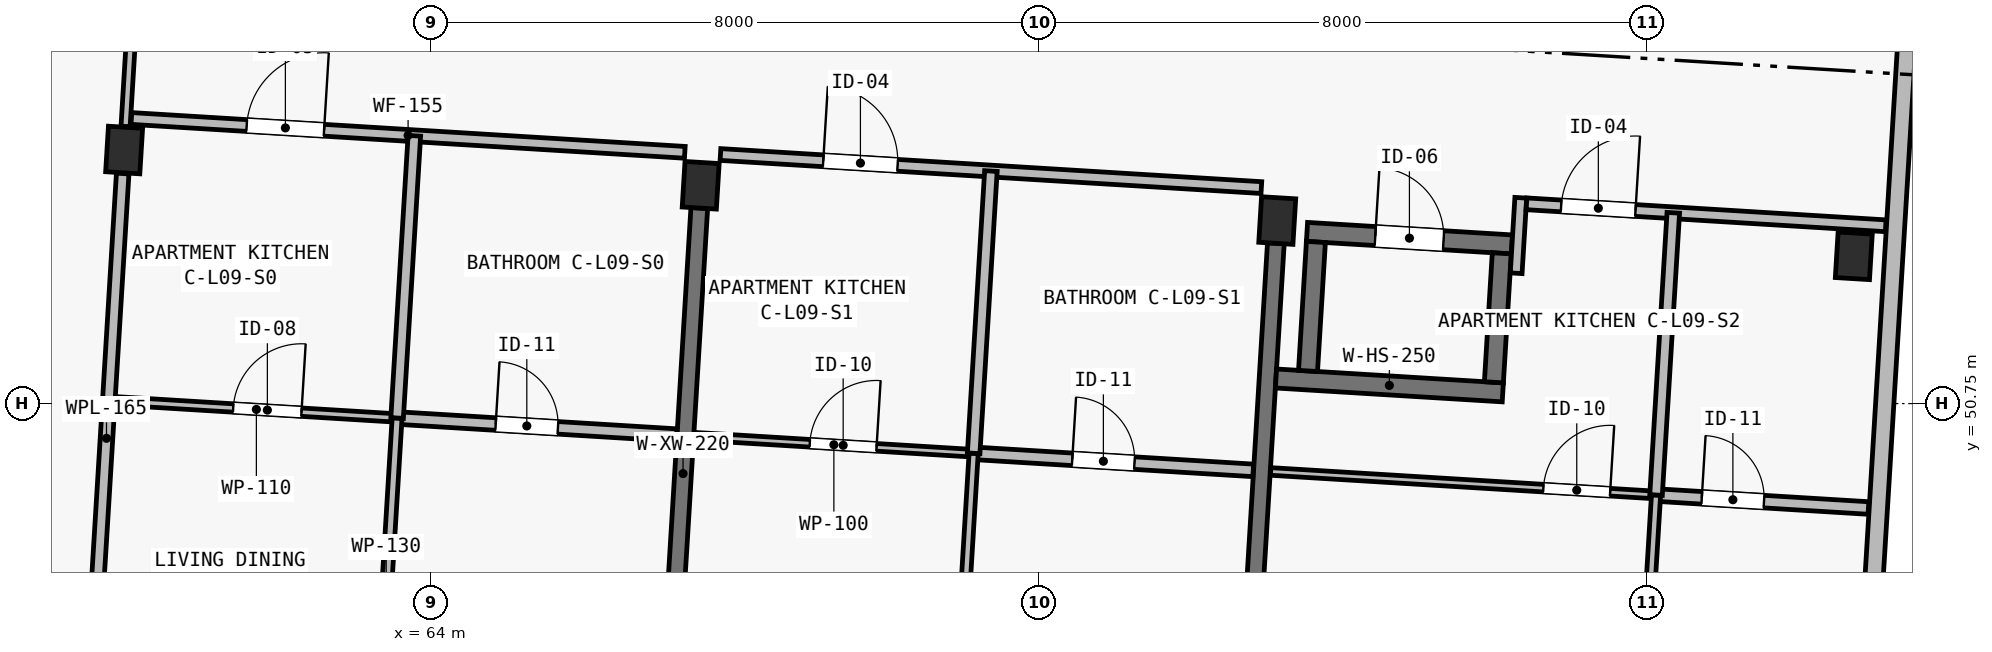
"""IFC4 building model, lengths in metres.
Left out: names, types, materials, properties, quantities, classifications, styles, units other than length and angle.
Written with IfcOpenShell. Run it as: python <this file> out.ifc"""

import sys

from ifc_helpers import new_model, si_unit, direction, frame, frame_2d, origin, origin_2d, place, context, subcontext, project, spatial, polyline, rectangle, outline, extrude, element, fill, save


model = new_model("IFC4")
c1 = context("Model", 3, precision=1e-05, world=origin(), true_north=direction((0.0, 1.0)))
c2 = subcontext(c1, "Body", "Model", "MODEL_VIEW")
j1 = project(units=[si_unit("LENGTHUNIT", "METRE"), si_unit("PLANEANGLEUNIT", "RADIAN")], contexts=[c1])
p1 = place(None, origin())
s1 = spatial("IfcSite", under=j1, at=p1, CompositionType="ELEMENT")
p2 = place(p1, origin())
s2 = spatial("IfcBuilding", under=s1, at=p2, CompositionType="ELEMENT")
p3 = place(p2, frame((0.0, 0.0, 31.15)))
s3 = spatial("IfcBuildingStorey", under=s2, at=p3, CompositionType="ELEMENT", Elevation=31.15)
p4 = place(p3, frame((59.964, 54.086, 0.0), z_axis=(0.0, 0.0, 1.0), x_axis=(0.998134798422, -0.061048539535, 0.0)))
e1 = element("IfcColumn", 1, at=p4, inside=s3, PredefinedType="COLUMN", context=c2, shape_type="SweptSolid", body=[
    extrude(rectangle(XDim=0.45, YDim=0.6, at=origin_2d()), origin(), (0.0, 0.0, 1.0), 6.895),
])
for number, where, z_axis, x_axis in (
    (2, (67.55, 53.622, 0.0), (0.0, 0.0, 1.0), (0.998, -0.061, 0.0)),
    (3, (75.135, 53.158, 0.0), (0.0, 0.0, 1.0), (0.998, -0.061, 0.0)),
):
    element("IfcColumn", number, at=place(p3, frame(where, z_axis=z_axis, x_axis=x_axis)), inside=s3, PredefinedType="COLUMN", context=c2, shape_type="SweptSolid", body=[
        extrude(rectangle(XDim=0.45, YDim=0.6, at=origin_2d()), origin(), (0.0, 0.0, 1.0), 3.25),
    ])
p5 = place(p3, frame((82.721, 52.694, 0.0), z_axis=(0.0, 0.0, 1.0), x_axis=(0.998134798422, -0.061048539535, 0.0)))
e4 = element("IfcColumn", 4, at=p5, inside=s3, PredefinedType="COLUMN", context=c2, shape_type="SweptSolid", body=[
    extrude(rectangle(XDim=0.45, YDim=0.6, at=origin_2d()), origin(), (0.0, 0.0, 1.0), 3.0),
])
p6 = place(p3, frame((67.104, 46.335, 0.0), z_axis=(0.0, 0.0, 1.0), x_axis=(0.061034188237, 0.998135676081, 0.0)))
e5 = element("IfcWall", 5, at=p6, inside=s3, PredefinedType="SHEAR", context=c2, shape_type="SweptSolid", body=[
    extrude(rectangle(XDim=7.0, YDim=0.22, at=frame_2d((3.5, 0.0))), origin(), (0.0, 0.0, 1.0), 2.5),
])
p7 = place(p3, frame((74.69, 45.872, 0.0), z_axis=(0.0, 0.0, 1.0), x_axis=(0.061036313012, 0.998135546153, 0.0)))
e6 = element("IfcWall", 6, at=p7, inside=s3, PredefinedType="SHEAR", context=c2, shape_type="SweptSolid", body=[
    extrude(rectangle(XDim=7.0, YDim=0.22, at=frame_2d((3.5, 0.0))), origin(), (0.0, 0.0, 1.0), 2.5),
])
p8 = place(p3, frame((75.119, 51.08, 0.0), z_axis=(0.0, 0.0, 1.0), x_axis=(0.998133370443, -0.061071882298, 0.0)))
e7 = element("IfcWall", 7, at=p8, inside=s3, PredefinedType="SHEAR", context=c2, shape_type="SweptSolid", body=[
    extrude(rectangle(XDim=2.99, YDim=0.25, at=frame_2d((1.495, 0.0))), origin(), (0.0, 0.0, 1.0), 3.25),
])
p9 = place(p3, frame((75.527, 53.009, 0.0), z_axis=(0.0, 0.0, 1.0), x_axis=(0.998129907752, -0.061128448781, 0.0)))
e8 = element("IfcWall", 8, at=p9, inside=s3, PredefinedType="SHEAR", context=c2, shape_type="SweptSolid", body=[
    extrude(rectangle(XDim=2.7, YDim=0.25, at=frame_2d((1.35, 0.0))), origin(), (0.0, 0.0, 1.0), 3.25),
])
p10 = place(p9, frame((0.9, 0.0, 0.0)))
e9 = element("IfcOpeningElement", 9, at=p10, cuts=e8, PredefinedType="OPENING", context=c2, shape_type="SweptSolid", body=[
    extrude(rectangle(XDim=0.9, YDim=2.05, at=frame_2d((0.45, 1.025))), frame((0.0, 0.14, 0.0), z_axis=(0.0, -1.0, 0.0), x_axis=(1.0, 0.0, 0.0)), (0.0, 0.0, 1.0), 0.28),
])
p11 = place(p3, frame((75.541, 51.179, 0.0), z_axis=(0.0, 0.0, 1.0), x_axis=(0.061037062968, 0.998135500293, 0.0)))
e10 = element("IfcWall", 10, at=p11, inside=s3, PredefinedType="SHEAR", context=c2, shape_type="SweptSolid", body=[
    extrude(rectangle(XDim=1.7, YDim=0.25, at=frame_2d((0.85, 0.0))), origin(), (0.0, 0.0, 1.0), 3.25),
])
p12 = place(p3, frame((77.986, 51.03, 0.0), z_axis=(0.0, 0.0, 1.0), x_axis=(0.061028314627, 0.998136035225, 0.0)))
e11 = element("IfcWall", 11, at=p12, inside=s3, PredefinedType="SHEAR", context=c2, shape_type="SweptSolid", body=[
    extrude(rectangle(XDim=1.7, YDim=0.25, at=frame_2d((0.85, 0.0))), origin(), (0.0, 0.0, 1.0), 3.25),
])
p13 = place(p3, frame((51.654, 49.585, 0.0), z_axis=(0.0, 0.0, 1.0), x_axis=(0.448621989068, 0.893721607059, 0.0)))
e12 = element("IfcWall", 12, at=p13, inside=s3, PredefinedType="SOLIDWALL", context=c2, shape_type="SweptSolid", body=[
    extrude(outline(polyline([(0.0, 0.0), (19.061, 0.0), (19.06, 7.561), (0.0, 9.003), (0.0, 0.0)])), frame((0.0, 0.13, 0.0), z_axis=(0.0, -1.0, 0.0), x_axis=(1.0, 0.0, 0.0)), (0.0, 0.0, 1.0), 0.26),
])
p14 = place(p13, frame((2.63, 0.0, 0.52)))
e13 = element("IfcOpeningElement", 13, at=p14, cuts=e12, PredefinedType="OPENING", context=c2, shape_type="SweptSolid", body=[
    extrude(rectangle(XDim=0.76, YDim=2.34, at=frame_2d((0.38, 1.17))), frame((0.0, 0.145, 0.0), z_axis=(0.0, -1.0, 0.0), x_axis=(1.0, 0.0, 0.0)), (0.0, 0.0, 1.0), 0.29),
])
p15 = place(p13, frame((15.47, 0.0, 0.45)))
e14 = element("IfcOpeningElement", 14, at=p15, cuts=e12, PredefinedType="OPENING", context=c2, shape_type="SweptSolid", body=[
    extrude(rectangle(XDim=0.6, YDim=2.22, at=frame_2d((0.3, 1.11))), frame((0.0, 0.145, 0.0), z_axis=(0.0, -1.0, 0.0), x_axis=(1.0, 0.0, 0.0)), (0.0, 0.0, 1.0), 0.29),
])
p16 = place(p3, frame((84.01, 65.164, 0.0), z_axis=(0.0, 0.0, 1.0), x_axis=(-0.061040833846, -0.998135269692, 0.0)))
e15 = element("IfcWall", 15, at=p16, inside=s3, PredefinedType="SOLIDWALL", context=c2, shape_type="SweptSolid", body=[
    extrude(rectangle(XDim=20.65, YDim=0.24, at=frame_2d((10.325, 0.0))), origin(), (0.0, 0.0, 1.0), 2.972),
])
p17 = place(p16, frame((2.63, 0.0, 0.52)))
e16 = element("IfcOpeningElement", 16, at=p17, cuts=e15, PredefinedType="OPENING", context=c2, shape_type="SweptSolid", body=[
    extrude(rectangle(XDim=0.72, YDim=2.16, at=frame_2d((0.36, 1.08))), frame((0.0, 0.135, 0.0), z_axis=(0.0, -1.0, 0.0), x_axis=(1.0, 0.0, 0.0)), (0.0, 0.0, 1.0), 0.27),
])
p18 = place(p16, frame((16.8, 0.0, 0.45)))
e17 = element("IfcOpeningElement", 17, at=p18, cuts=e15, PredefinedType="OPENING", context=c2, shape_type="SweptSolid", body=[
    extrude(rectangle(XDim=0.86, YDim=2.36, at=frame_2d((0.43, 1.18))), frame((0.0, 0.135, 0.0), z_axis=(0.0, -1.0, 0.0), x_axis=(1.0, 0.0, 0.0)), (0.0, 0.0, 1.0), 0.27),
])
p19 = place(p3, frame((59.983, 54.395, 0.0), z_axis=(0.0, 0.0, 1.0), x_axis=(0.061035211258, 0.998135613525, 0.0)))
e18 = element("IfcWall", 18, at=p19, inside=s3, PredefinedType="PARTITIONING", context=c2, shape_type="SweptSolid", body=[
    extrude(rectangle(XDim=3.78, YDim=0.12, at=frame_2d((1.89, 0.0))), origin(), (0.0, 0.0, 1.0), 3.15),
])
p20 = place(p19, frame((1.35, 0.0, 0.0)))
e19 = element("IfcOpeningElement", 19, at=p20, cuts=e18, PredefinedType="OPENING", context=c2, shape_type="SweptSolid", body=[
    extrude(rectangle(XDim=0.88, YDim=2.1, at=frame_2d((0.44, 1.05))), frame((0.0, 0.075, 0.0), z_axis=(0.0, -1.0, 0.0), x_axis=(1.0, 0.0, 0.0)), (0.0, 0.0, 1.0), 0.15),
])
p21 = place(p3, frame((59.519, 46.809, 0.0), z_axis=(0.0, 0.0, 1.0), x_axis=(0.061034681366, 0.998135645927, 0.0)))
e20 = element("IfcWall", 20, at=p21, inside=s3, PredefinedType="PLUMBINGWALL", context=c2, shape_type="SweptSolid", body=[
    extrude(rectangle(XDim=6.98, YDim=0.165, at=frame_2d((3.49, 0.0))), origin(), (0.0, 0.0, 1.0), 3.15),
])
p22 = place(p3, frame((60.06, 54.501, 0.0), z_axis=(0.0, 0.0, 1.0), x_axis=(0.998135030865, -0.061044739012, 0.0)))
e21 = element("IfcWall", 21, at=p22, inside=s3, PredefinedType="PARTITIONING", context=c2, shape_type="SweptSolid", body=[
    extrude(rectangle(XDim=7.295, YDim=0.155, at=frame_2d((3.647, 0.0))), origin(), (0.0, 0.0, 1.0), 3.15),
])
p23 = place(p22, frame((1.52, 0.0, 0.0)))
e22 = element("IfcOpeningElement", 22, at=p23, cuts=e21, PredefinedType="OPENING", context=c2, shape_type="SweptSolid", body=[
    extrude(rectangle(XDim=1.02, YDim=2.2, at=frame_2d((0.51, 1.1))), frame((0.0, 0.093, 0.0), z_axis=(0.0, -1.0, 0.0), x_axis=(1.0, 0.0, 0.0)), (0.0, 0.0, 1.0), 0.185),
])
p24 = place(p3, frame((59.852, 50.786, 0.0), z_axis=(0.0, 0.0, 1.0), x_axis=(0.998137662841, -0.061001688651, 0.0)))
e23 = element("IfcWall", 23, at=p24, inside=s3, PredefinedType="PARTITIONING", context=c2, shape_type="SweptSolid", body=[
    extrude(rectangle(XDim=3.71, YDim=0.11, at=frame_2d((1.855, 0.0))), origin(), (0.0, 0.0, 1.0), 3.15),
])
p25 = place(p24, frame((1.55, 0.0, 0.0)))
e24 = element("IfcOpeningElement", 24, at=p25, cuts=e23, PredefinedType="OPENING", context=c2, shape_type="SweptSolid", body=[
    extrude(rectangle(XDim=0.9, YDim=2.1, at=frame_2d((0.45, 1.05))), frame((0.0, 0.07, 0.0), z_axis=(0.0, -1.0, 0.0), x_axis=(1.0, 0.0, 0.0)), (0.0, 0.0, 1.0), 0.14),
])
p26 = place(p3, frame((63.555, 50.56, 0.0), z_axis=(0.0, 0.0, 1.0), x_axis=(0.998132682596, -0.061083123148, 0.0)))
e25 = element("IfcWall", 25, at=p26, inside=s3, PredefinedType="PLUMBINGWALL", context=c2, shape_type="SweptSolid", body=[
    extrude(rectangle(XDim=3.685, YDim=0.165, at=frame_2d((1.843, 0.0))), origin(), (0.0, 0.0, 1.0), 3.15),
])
p27 = place(p26, frame((1.3, 0.0, 0.0)))
e26 = element("IfcOpeningElement", 26, at=p27, cuts=e25, PredefinedType="OPENING", context=c2, shape_type="SweptSolid", body=[
    extrude(rectangle(XDim=0.82, YDim=2.08, at=frame_2d((0.41, 1.04))), frame((0.0, 0.097, 0.0), z_axis=(0.0, -1.0, 0.0), x_axis=(1.0, 0.0, 0.0)), (0.0, 0.0, 1.0), 0.195),
])
p28 = place(p3, frame((63.269, 45.879, 0.0), z_axis=(0.0, 0.0, 1.0), x_axis=(0.061059262019, 0.998134142549, 0.0)))
e27 = element("IfcWall", 27, at=p28, inside=s3, PredefinedType="PARTITIONING", context=c2, shape_type="SweptSolid", body=[
    extrude(rectangle(XDim=4.69, YDim=0.13, at=frame_2d((2.345, 0.0))), origin(), (0.0, 0.0, 1.0), 3.15),
])
p29 = place(p28, frame((1.35, 0.0, 0.0)))
e28 = element("IfcOpeningElement", 28, at=p29, cuts=e27, PredefinedType="OPENING", context=c2, shape_type="SweptSolid", body=[
    extrude(rectangle(XDim=0.88, YDim=2.1, at=frame_2d((0.44, 1.05))), frame((0.0, 0.08, 0.0), z_axis=(0.0, -1.0, 0.0), x_axis=(1.0, 0.0, 0.0)), (0.0, 0.0, 1.0), 0.16),
])
p30 = place(p3, frame((63.555, 50.56, 0.0), z_axis=(0.0, 0.0, 1.0), x_axis=(0.061038003798, 0.998135442759, 0.0)))
e29 = element("IfcWall", 29, at=p30, inside=s3, PredefinedType="PLUMBINGWALL", context=c2, shape_type="SweptSolid", body=[
    extrude(rectangle(XDim=3.72, YDim=0.165, at=frame_2d((1.86, 0.0))), origin(), (0.0, 0.0, 1.0), 3.15),
])
p31 = place(p3, frame((67.81, 54.027, 0.0), z_axis=(0.0, 0.0, 1.0), x_axis=(0.998136655722, -0.061018165369, 0.0)))
e30 = element("IfcWall", 30, at=p31, inside=s3, PredefinedType="PARTITIONING", context=c2, shape_type="SweptSolid", body=[
    extrude(rectangle(XDim=7.13, YDim=0.155, at=frame_2d((3.565, 0.0))), origin(), (0.0, 0.0, 1.0), 3.15),
])
p32 = place(p31, frame((1.355, 0.0, 0.0)))
e31 = element("IfcOpeningElement", 31, at=p32, cuts=e30, PredefinedType="OPENING", context=c2, shape_type="SweptSolid", body=[
    extrude(rectangle(XDim=0.98, YDim=2.15, at=frame_2d((0.49, 1.075))), frame((0.0, 0.093, 0.0), z_axis=(0.0, -1.0, 0.0), x_axis=(1.0, 0.0, 0.0)), (0.0, 0.0, 1.0), 0.185),
])
p33 = place(p3, frame((67.463, 50.321, 0.0), z_axis=(0.0, 0.0, 1.0), x_axis=(0.998132682596, -0.061083123148, 0.0)))
e32 = element("IfcWall", 32, at=p33, inside=s3, PredefinedType="PARTITIONING", context=c2, shape_type="SweptSolid", body=[
    extrude(rectangle(XDim=3.685, YDim=0.1, at=frame_2d((1.843, 0.0))), origin(), (0.0, 0.0, 1.0), 3.15),
])
p34 = place(p33, frame((1.525, 0.0, 0.0)))
e33 = element("IfcOpeningElement", 33, at=p34, cuts=e32, PredefinedType="OPENING", context=c2, shape_type="SweptSolid", body=[
    extrude(rectangle(XDim=0.88, YDim=2.1, at=frame_2d((0.44, 1.05))), frame((0.0, 0.065, 0.0), z_axis=(0.0, -1.0, 0.0), x_axis=(1.0, 0.0, 0.0)), (0.0, 0.0, 1.0), 0.13),
])
p35 = place(p3, frame((71.141, 50.096, 0.0), z_axis=(0.0, 0.0, 1.0), x_axis=(0.998136472989, -0.061021154439, 0.0)))
e34 = element("IfcWall", 34, at=p35, inside=s3, PredefinedType="PLUMBINGWALL", context=c2, shape_type="SweptSolid", body=[
    extrude(rectangle(XDim=3.685, YDim=0.165, at=frame_2d((1.842, 0.0))), origin(), (0.0, 0.0, 1.0), 3.15),
])
p36 = place(p35, frame((1.3, 0.0, 0.0)))
e35 = element("IfcOpeningElement", 35, at=p36, cuts=e34, PredefinedType="OPENING", context=c2, shape_type="SweptSolid", body=[
    extrude(rectangle(XDim=0.82, YDim=2.08, at=frame_2d((0.41, 1.04))), frame((0.0, 0.097, 0.0), z_axis=(0.0, -1.0, 0.0), x_axis=(1.0, 0.0, 0.0)), (0.0, 0.0, 1.0), 0.195),
])
p37 = place(p3, frame((70.855, 45.415, 0.0), z_axis=(0.0, 0.0, 1.0), x_axis=(0.061062434628, 0.998133948465, 0.0)))
e36 = element("IfcWall", 36, at=p37, inside=s3, PredefinedType="PARTITIONING", context=c2, shape_type="SweptSolid", body=[
    extrude(rectangle(XDim=4.69, YDim=0.12, at=frame_2d((2.345, 0.0))), origin(), (0.0, 0.0, 1.0), 3.15),
])
p38 = place(p37, frame((1.35, 0.0, 0.0)))
e37 = element("IfcOpeningElement", 37, at=p38, cuts=e36, PredefinedType="OPENING", context=c2, shape_type="SweptSolid", body=[
    extrude(rectangle(XDim=0.9, YDim=2.1, at=frame_2d((0.45, 1.05))), frame((0.0, 0.075, 0.0), z_axis=(0.0, -1.0, 0.0), x_axis=(1.0, 0.0, 0.0)), (0.0, 0.0, 1.0), 0.15),
])
p39 = place(p3, frame((71.141, 50.096, 0.0), z_axis=(0.0, 0.0, 1.0), x_axis=(0.061034005467, 0.998135687257, 0.0)))
e38 = element("IfcWall", 38, at=p39, inside=s3, PredefinedType="PLUMBINGWALL", context=c2, shape_type="SweptSolid", body=[
    extrude(rectangle(XDim=3.72, YDim=0.165, at=frame_2d((1.86, 0.0))), origin(), (0.0, 0.0, 1.0), 3.15),
])
p40 = place(p3, frame((78.279, 52.465, 0.0), z_axis=(0.0, 0.0, 1.0), x_axis=(0.061095097219, 0.998131949742, 0.0)))
e39 = element("IfcWall", 39, at=p40, inside=s3, PredefinedType="PARTITIONING", context=c2, shape_type="SweptSolid", body=[
    extrude(rectangle(XDim=0.995, YDim=0.155, at=frame_2d((0.498, 0.0))), origin(), (0.0, 0.0, 1.0), 3.018),
])
p41 = place(p3, frame((78.415, 53.378, 0.0), z_axis=(0.0, 0.0, 1.0), x_axis=(0.998134754438, -0.061049258666, 0.0)))
e40 = element("IfcWall", 40, at=p41, inside=s3, PredefinedType="PARTITIONING", context=c2, shape_type="SweptSolid", body=[
    extrude(rectangle(XDim=4.735, YDim=0.155, at=frame_2d((2.367, 0.0))), origin(), (0.0, 0.0, 1.0), 3.018),
])
p42 = place(p41, frame((0.457, 0.0, 0.0)))
e41 = element("IfcOpeningElement", 41, at=p42, cuts=e40, PredefinedType="OPENING", context=c2, shape_type="SweptSolid", body=[
    extrude(rectangle(XDim=0.98, YDim=2.15, at=frame_2d((0.49, 1.075))), frame((0.0, 0.093, 0.0), z_axis=(0.0, -1.0, 0.0), x_axis=(1.0, 0.0, 0.0)), (0.0, 0.0, 1.0), 0.185),
])
p43 = place(p3, frame((75.049, 49.857, 0.0), z_axis=(0.0, 0.0, 1.0), x_axis=(0.998135637207, -0.061034823981, 0.0)))
e42 = element("IfcWall", 42, at=p43, inside=s3, PredefinedType="PARTITIONING", context=c2, shape_type="SweptSolid", body=[
    extrude(rectangle(XDim=5.08, YDim=0.1, at=frame_2d((2.54, 0.0))), origin(), (0.0, 0.0, 1.0), 3.018),
])
p44 = place(p43, frame((3.595, 0.0, 0.0)))
e43 = element("IfcOpeningElement", 43, at=p44, cuts=e42, PredefinedType="OPENING", context=c2, shape_type="SweptSolid", body=[
    extrude(rectangle(XDim=0.88, YDim=2.1, at=frame_2d((0.44, 1.05))), frame((0.0, 0.065, 0.0), z_axis=(0.0, -1.0, 0.0), x_axis=(1.0, 0.0, 0.0)), (0.0, 0.0, 1.0), 0.13),
])
p45 = place(p3, frame((80.119, 49.547, 0.0), z_axis=(0.0, 0.0, 1.0), x_axis=(0.998135805996, -0.061032063609, 0.0)))
e44 = element("IfcWall", 44, at=p45, inside=s3, PredefinedType="PLUMBINGWALL", context=c2, shape_type="SweptSolid", body=[
    extrude(rectangle(XDim=2.8, YDim=0.165, at=frame_2d((1.4, 0.0))), origin(), (0.0, 0.0, 1.0), 3.018),
])
p46 = place(p45, frame((0.603, 0.0, 0.0)))
e45 = element("IfcOpeningElement", 45, at=p46, cuts=e44, PredefinedType="OPENING", context=c2, shape_type="SweptSolid", body=[
    extrude(rectangle(XDim=0.82, YDim=2.08, at=frame_2d((0.41, 1.04))), frame((0.0, 0.097, 0.0), z_axis=(0.0, -1.0, 0.0), x_axis=(1.0, 0.0, 0.0)), (0.0, 0.0, 1.0), 0.195),
])
p47 = place(p3, frame((79.833, 44.866, 0.0), z_axis=(0.0, 0.0, 1.0), x_axis=(0.061010571843, 0.998137119901, 0.0)))
e46 = element("IfcWall", 46, at=p47, inside=s3, PredefinedType="PARTITIONING", context=c2, shape_type="SweptSolid", body=[
    extrude(rectangle(XDim=4.69, YDim=0.12, at=frame_2d((2.345, 0.0))), origin(), (0.0, 0.0, 1.0), 3.018),
])
p48 = place(p47, frame((1.35, 0.0, 0.0)))
e47 = element("IfcOpeningElement", 47, at=p48, cuts=e46, PredefinedType="OPENING", context=c2, shape_type="SweptSolid", body=[
    extrude(rectangle(XDim=0.9, YDim=2.1, at=frame_2d((0.45, 1.05))), frame((0.0, 0.075, 0.0), z_axis=(0.0, -1.0, 0.0), x_axis=(1.0, 0.0, 0.0)), (0.0, 0.0, 1.0), 0.15),
])
p49 = place(p3, frame((80.119, 49.547, 0.0), z_axis=(0.0, 0.0, 1.0), x_axis=(0.061099388563, 0.998131687062, 0.0)))
e48 = element("IfcWall", 48, at=p49, inside=s3, PredefinedType="PLUMBINGWALL", context=c2, shape_type="SweptSolid", body=[
    extrude(rectangle(XDim=3.72, YDim=0.165, at=frame_2d((1.86, 0.0))), origin(), (0.0, 0.0, 1.0), 3.018),
])
p50 = place(p23, origin())
e49 = element("IfcDoor", 49, at=p50, inside=s3, OperationType="SINGLE_SWING_RIGHT", PredefinedType="DOOR", context=c2, shape_type="SweptSolid", body=[
    extrude(rectangle(XDim=1.02, YDim=2.2, at=frame_2d((0.51, 1.1))), frame((0.0, 0.025, 0.0), z_axis=(0.0, -1.0, 0.0), x_axis=(1.0, 0.0, 0.0)), (0.0, 0.0, 1.0), 0.05),
])
fill(e22, e49)
p51 = place(p25, origin())
e50 = element("IfcDoor", 50, at=p51, inside=s3, OperationType="SINGLE_SWING_RIGHT", PredefinedType="DOOR", context=c2, shape_type="SweptSolid", body=[
    extrude(rectangle(XDim=0.9, YDim=2.1, at=frame_2d((0.45, 1.05))), frame((0.0, 0.025, 0.0), z_axis=(0.0, -1.0, 0.0), x_axis=(1.0, 0.0, 0.0)), (0.0, 0.0, 1.0), 0.05),
])
fill(e24, e50)
p52 = place(p27, origin())
e51 = element("IfcDoor", 51, at=p52, inside=s3, OperationType="SINGLE_SWING_LEFT", PredefinedType="DOOR", context=c2, shape_type="SweptSolid", body=[
    extrude(rectangle(XDim=0.82, YDim=2.08, at=frame_2d((0.41, 1.04))), frame((0.0, 0.025, 0.0), z_axis=(0.0, -1.0, 0.0), x_axis=(1.0, 0.0, 0.0)), (0.0, 0.0, 1.0), 0.05),
])
fill(e26, e51)
p53 = place(p32, origin())
e52 = element("IfcDoor", 52, at=p53, inside=s3, OperationType="SINGLE_SWING_LEFT", PredefinedType="DOOR", context=c2, shape_type="SweptSolid", body=[
    extrude(rectangle(XDim=0.98, YDim=2.15, at=frame_2d((0.49, 1.075))), frame((0.0, 0.025, 0.0), z_axis=(0.0, -1.0, 0.0), x_axis=(1.0, 0.0, 0.0)), (0.0, 0.0, 1.0), 0.05),
])
fill(e31, e52)
p54 = place(p34, origin())
e53 = element("IfcDoor", 53, at=p54, inside=s3, OperationType="SINGLE_SWING_RIGHT", PredefinedType="DOOR", context=c2, shape_type="SweptSolid", body=[
    extrude(rectangle(XDim=0.88, YDim=2.1, at=frame_2d((0.44, 1.05))), frame((0.0, 0.025, 0.0), z_axis=(0.0, -1.0, 0.0), x_axis=(1.0, 0.0, 0.0)), (0.0, 0.0, 1.0), 0.05),
])
fill(e33, e53)
p55 = place(p36, origin())
e54 = element("IfcDoor", 54, at=p55, inside=s3, OperationType="SINGLE_SWING_LEFT", PredefinedType="DOOR", context=c2, shape_type="SweptSolid", body=[
    extrude(rectangle(XDim=0.82, YDim=2.08, at=frame_2d((0.41, 1.04))), frame((0.0, 0.025, 0.0), z_axis=(0.0, -1.0, 0.0), x_axis=(1.0, 0.0, 0.0)), (0.0, 0.0, 1.0), 0.05),
])
fill(e35, e54)
p56 = place(p42, origin())
e55 = element("IfcDoor", 55, at=p56, inside=s3, OperationType="SINGLE_SWING_RIGHT", PredefinedType="DOOR", context=c2, shape_type="SweptSolid", body=[
    extrude(rectangle(XDim=0.98, YDim=2.15, at=frame_2d((0.49, 1.075))), frame((0.0, 0.025, 0.0), z_axis=(0.0, -1.0, 0.0), x_axis=(1.0, 0.0, 0.0)), (0.0, 0.0, 1.0), 0.05),
])
fill(e41, e55)
p57 = place(p44, origin())
e56 = element("IfcDoor", 56, at=p57, inside=s3, OperationType="SINGLE_SWING_RIGHT", PredefinedType="DOOR", context=c2, shape_type="SweptSolid", body=[
    extrude(rectangle(XDim=0.88, YDim=2.1, at=frame_2d((0.44, 1.05))), frame((0.0, 0.025, 0.0), z_axis=(0.0, -1.0, 0.0), x_axis=(1.0, 0.0, 0.0)), (0.0, 0.0, 1.0), 0.05),
])
fill(e43, e56)
p58 = place(p46, origin())
e57 = element("IfcDoor", 57, at=p58, inside=s3, OperationType="SINGLE_SWING_LEFT", PredefinedType="DOOR", context=c2, shape_type="SweptSolid", body=[
    extrude(rectangle(XDim=0.82, YDim=2.08, at=frame_2d((0.41, 1.04))), frame((0.0, 0.025, 0.0), z_axis=(0.0, -1.0, 0.0), x_axis=(1.0, 0.0, 0.0)), (0.0, 0.0, 1.0), 0.05),
])
fill(e45, e57)
p59 = place(p10, origin())
e58 = element("IfcDoor", 58, at=p59, inside=s3, OperationType="SINGLE_SWING_LEFT", PredefinedType="DOOR", context=c2, shape_type="SweptSolid", body=[
    extrude(rectangle(XDim=0.9, YDim=2.05, at=frame_2d((0.45, 1.025))), frame((0.0, 0.025, 0.0), z_axis=(0.0, -1.0, 0.0), x_axis=(1.0, 0.0, 0.0)), (0.0, 0.0, 1.0), 0.05),
])
fill(e9, e58)
save(model, sys.argv[1])
